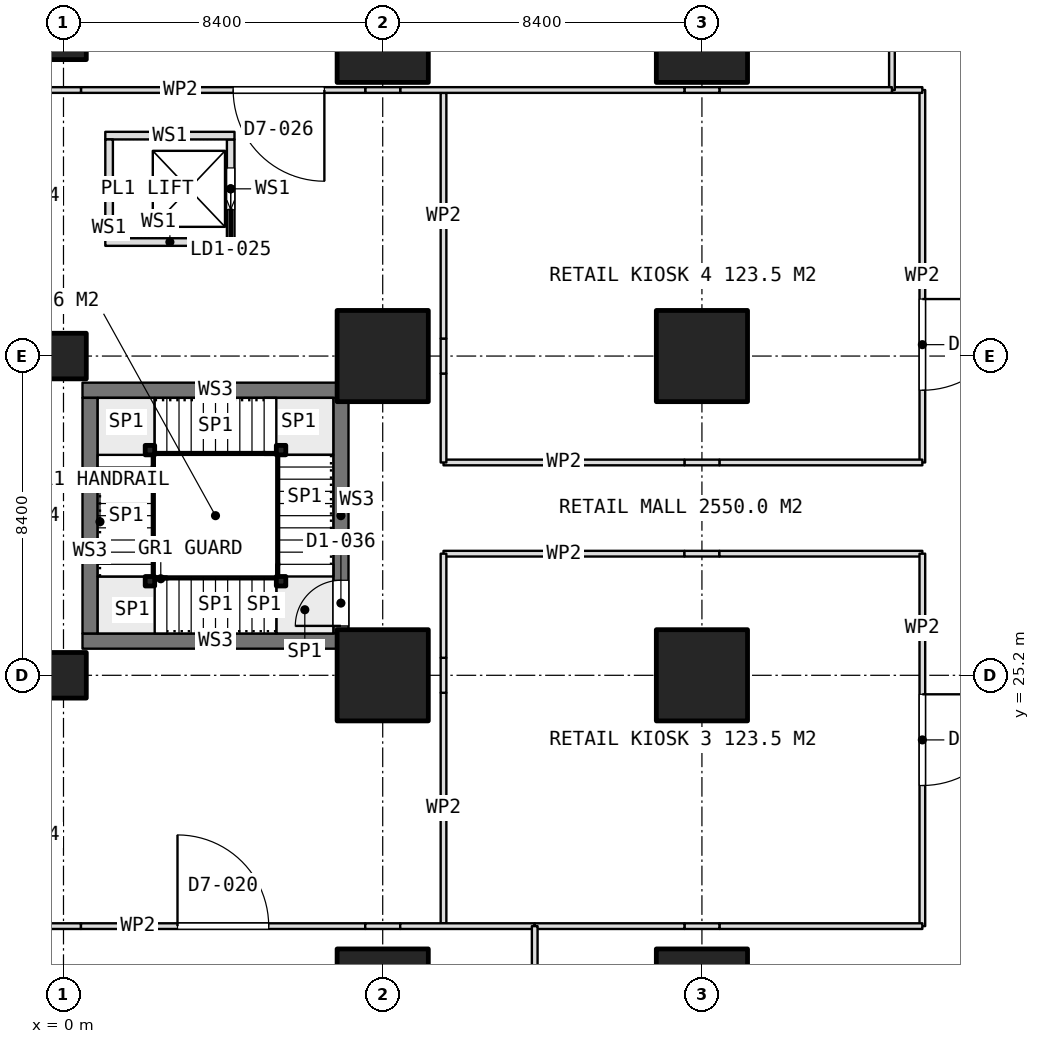
"""IFC4 building model, lengths in metres.
Left out: names, types, materials, properties, quantities, classifications, styles, units other than length and angle.
Written with IfcOpenShell. Run it as: python <this file> out.ifc"""

import sys

from ifc_helpers import new_model, si_unit, direction, frame, frame_2d, origin, origin_2d, place, context, subcontext, project, spatial, rectangle, extrude, element, fill, save


model = new_model("IFC4")
c1 = context("Model", 3, precision=1e-05, world=origin(), true_north=direction((0.0, 1.0)))
c2 = subcontext(c1, "Body", "Model", "MODEL_VIEW")
j1 = project(units=[si_unit("LENGTHUNIT", "METRE"), si_unit("PLANEANGLEUNIT", "RADIAN")], contexts=[c1])
p1 = place(None, origin())
s1 = spatial("IfcSite", under=j1, at=p1, CompositionType="ELEMENT")
p2 = place(p1, origin())
s2 = spatial("IfcBuilding", under=s1, at=p2, CompositionType="ELEMENT")
p3 = place(p2, frame((0.0, 0.0, 10.4)))
s3 = spatial("IfcBuildingStorey", under=s2, at=p3, CompositionType="ELEMENT", Elevation=10.4)
for number, where, z_axis, x_axis in (
    (1, (0.0, 25.2, 0.0), (0.0, 0.0, 1.0), (1.0, 0.0, 0.0)),
    (2, (0.0, 33.6, 0.0), (0.0, 0.0, 1.0), (1.0, 0.0, 0.0)),
    (3, (0.0, 42.0, 0.0), (0.0, 0.0, 1.0), (1.0, 0.0, 0.0)),
):
    element("IfcColumn", number, at=place(p3, frame(where, z_axis=z_axis, x_axis=x_axis)), inside=s3, PredefinedType="COLUMN", context=c2, shape_type="SweptSolid", body=[
        extrude(rectangle(XDim=1.2, YDim=1.2, at=origin_2d()), origin(), (0.0, 0.0, 1.0), 5.0),
    ])
for number, where, z_axis, x_axis in (
    (4, (8.4, 16.8, 0.0), (0.0, 0.0, 1.0), (1.0, 0.0, 0.0)),
    (5, (8.4, 25.2, 0.0), (0.0, 0.0, 1.0), (1.0, 0.0, 0.0)),
    (6, (8.4, 33.6, 0.0), (0.0, 0.0, 1.0), (1.0, 0.0, 0.0)),
    (7, (8.4, 42.0, 0.0), (0.0, 0.0, 1.0), (1.0, 0.0, 0.0)),
    (8, (16.8, 16.8, 0.0), (0.0, 0.0, 1.0), (1.0, 0.0, 0.0)),
    (9, (16.8, 25.2, 0.0), (0.0, 0.0, 1.0), (1.0, 0.0, 0.0)),
    (10, (16.8, 33.6, 0.0), (0.0, 0.0, 1.0), (1.0, 0.0, 0.0)),
    (11, (16.8, 42.0, 0.0), (0.0, 0.0, 1.0), (1.0, 0.0, 0.0)),
):
    element("IfcColumn", number, at=place(p3, frame(where, z_axis=z_axis, x_axis=x_axis)), inside=s3, PredefinedType="COLUMN", context=c2, shape_type="SweptSolid", body=[
        extrude(rectangle(XDim=2.4, YDim=2.4, at=origin_2d()), origin(), (0.0, 0.0, 1.0), 5.0),
    ])
for number, where, z_axis, x_axis in (
    (12, (0.5, 26.1, 0.0), (0.0, 0.0, 1.0), (1.0, 0.0, 0.0)),
    (13, (0.5, 32.7, 0.0), (0.0, 0.0, 1.0), (1.0, 0.0, 0.0)),
):
    element("IfcWall", number, at=place(p3, frame(where, z_axis=z_axis, x_axis=x_axis)), inside=s3, PredefinedType="SOLIDWALL", context=c2, shape_type="SweptSolid", body=[
        extrude(rectangle(XDim=7.0, YDim=0.4, at=frame_2d((3.5, 0.0))), origin(), (0.0, 0.0, 1.0), 4.7),
    ])
p4 = place(p3, frame((0.7, 26.3, 0.0), z_axis=(0.0, 0.0, 1.0), x_axis=(0.0, 1.0, 0.0)))
e14 = element("IfcWall", 14, at=p4, inside=s3, PredefinedType="SOLIDWALL", context=c2, shape_type="SweptSolid", body=[
    extrude(rectangle(XDim=6.2, YDim=0.4, at=frame_2d((3.1, 0.0))), origin(), (0.0, 0.0, 1.0), 4.7),
])
p5 = place(p3, frame((7.3, 26.3, 0.0), z_axis=(0.0, 0.0, 1.0), x_axis=(0.0, 1.0, 0.0)))
e15 = element("IfcWall", 15, at=p5, inside=s3, PredefinedType="SOLIDWALL", context=c2, shape_type="SweptSolid", body=[
    extrude(rectangle(XDim=6.2, YDim=0.4, at=frame_2d((3.1, 0.0))), origin(), (0.0, 0.0, 1.0), 4.7),
])
p6 = place(p5, frame((0.2, 0.0, 0.0)))
e16 = element("IfcOpeningElement", 16, at=p6, cuts=e15, PredefinedType="OPENING", context=c2, shape_type="SweptSolid", body=[
    extrude(rectangle(XDim=1.2, YDim=2.1, at=frame_2d((0.6, 1.05))), frame((0.0, 0.21, 0.0), z_axis=(0.0, -1.0, 0.0), x_axis=(1.0, 0.0, 0.0)), (0.0, 0.0, 1.0), 0.42),
])
for number, where, z_axis, x_axis in (
    (17, (1.1, 36.6, 0.0), (0.0, 0.0, 1.0), (1.0, 0.0, 0.0)),
    (18, (1.1, 39.4, 0.0), (0.0, 0.0, 1.0), (1.0, 0.0, 0.0)),
):
    element("IfcWall", number, at=place(p3, frame(where, z_axis=z_axis, x_axis=x_axis)), inside=s3, PredefinedType="PARTITIONING", context=c2, shape_type="SweptSolid", body=[
        extrude(rectangle(XDim=3.4, YDim=0.2, at=frame_2d((1.7, 0.0))), origin(), (0.0, 0.0, 1.0), 2.9),
    ])
p7 = place(p3, frame((1.2, 36.7, 0.0), z_axis=(0.0, 0.0, 1.0), x_axis=(0.0, 1.0, 0.0)))
e19 = element("IfcWall", 19, at=p7, inside=s3, PredefinedType="PARTITIONING", context=c2, shape_type="SweptSolid", body=[
    extrude(rectangle(XDim=2.6, YDim=0.2, at=frame_2d((1.3, 0.0))), origin(), (0.0, 0.0, 1.0), 2.9),
])
p8 = place(p3, frame((4.4, 36.7, 0.0), z_axis=(0.0, 0.0, 1.0), x_axis=(0.0, 1.0, 0.0)))
e20 = element("IfcWall", 20, at=p8, inside=s3, PredefinedType="PARTITIONING", context=c2, shape_type="SweptSolid", body=[
    extrude(rectangle(XDim=2.6, YDim=0.2, at=frame_2d((1.3, 0.0))), origin(), (0.0, 0.0, 1.0), 2.9),
])
p9 = place(p8, frame((0.75, 0.0, 0.0)))
e21 = element("IfcOpeningElement", 21, at=p9, cuts=e20, PredefinedType="OPENING", context=c2, shape_type="SweptSolid", body=[
    extrude(rectangle(XDim=1.1, YDim=2.1, at=frame_2d((0.55, 1.05))), frame((0.0, 0.11, 0.0), z_axis=(0.0, -1.0, 0.0), x_axis=(1.0, 0.0, 0.0)), (0.0, 0.0, 1.0), 0.22),
])
p10 = place(p3, frame((21.8, 49.94, 0.0), z_axis=(0.0, 0.0, 1.0), x_axis=(0.0, -1.0, 0.0)))
e22 = element("IfcWall", 22, at=p10, inside=s3, PredefinedType="PARTITIONING", context=c2, shape_type="SweptSolid", body=[
    extrude(rectangle(XDim=9.34, YDim=0.15, at=frame_2d((4.67, 0.0))), origin(), (0.0, 0.0, 1.0), 4.7),
])
p11 = place(p10, frame((3.005, 0.0, 0.0)))
e23 = element("IfcOpeningElement", 23, at=p11, cuts=e22, PredefinedType="OPENING", context=c2, shape_type="SweptSolid", body=[
    extrude(rectangle(XDim=2.4, YDim=2.4, at=frame_2d((1.2, 1.2))), frame((0.0, 0.085, 0.0), z_axis=(0.0, -1.0, 0.0), x_axis=(1.0, 0.0, 0.0)), (0.0, 0.0, 1.0), 0.17),
])
p12 = place(p3, frame((21.8, 40.6, 0.0), z_axis=(0.0, 0.0, 1.0), x_axis=(-1.0, 0.0, 0.0)))
e24 = element("IfcWall", 24, at=p12, inside=s3, PredefinedType="PARTITIONING", context=c2, shape_type="SweptSolid", body=[
    extrude(rectangle(XDim=4.54, YDim=0.15, at=frame_2d((2.27, 0.0))), origin(), (0.0, 0.0, 1.0), 4.7),
])
p13 = place(p3, frame((17.26, 40.6, 0.0), z_axis=(0.0, 0.0, 1.0), x_axis=(-1.0, 0.0, 0.0)))
e25 = element("IfcWall", 25, at=p13, inside=s3, PredefinedType="PARTITIONING", context=c2, shape_type="SweptSolid", body=[
    extrude(rectangle(XDim=0.92, YDim=0.15, at=frame_2d((0.46, 0.0))), origin(), (0.0, 0.0, 1.0), 2.9),
])
p14 = place(p3, frame((16.34, 40.6, 0.0), z_axis=(0.0, 0.0, 1.0), x_axis=(-1.0, 0.0, 0.0)))
e26 = element("IfcWall", 26, at=p14, inside=s3, PredefinedType="PARTITIONING", context=c2, shape_type="SweptSolid", body=[
    extrude(rectangle(XDim=7.48, YDim=0.15, at=frame_2d((3.74, 0.0))), origin(), (0.0, 0.0, 1.0), 4.7),
])
p15 = place(p3, frame((8.86, 40.6, 0.0), z_axis=(0.0, 0.0, 1.0), x_axis=(-1.0, 0.0, 0.0)))
e27 = element("IfcWall", 27, at=p15, inside=s3, PredefinedType="PARTITIONING", context=c2, shape_type="SweptSolid", body=[
    extrude(rectangle(XDim=0.92, YDim=0.15, at=frame_2d((0.46, 0.0))), origin(), (0.0, 0.0, 1.0), 2.9),
])
p16 = place(p3, frame((7.94, 40.6, 0.0), z_axis=(0.0, 0.0, 1.0), x_axis=(-1.0, 0.0, 0.0)))
e28 = element("IfcWall", 28, at=p16, inside=s3, PredefinedType="PARTITIONING", context=c2, shape_type="SweptSolid", body=[
    extrude(rectangle(XDim=7.48, YDim=0.15, at=frame_2d((3.74, 0.0))), origin(), (0.0, 0.0, 1.0), 4.7),
])
p17 = place(p16, frame((1.075, 0.0, 0.0)))
e29 = element("IfcOpeningElement", 29, at=p17, cuts=e28, PredefinedType="OPENING", context=c2, shape_type="SweptSolid", body=[
    extrude(rectangle(XDim=2.4, YDim=2.4, at=frame_2d((1.2, 1.2))), frame((0.0, 0.085, 0.0), z_axis=(0.0, -1.0, 0.0), x_axis=(1.0, 0.0, 0.0)), (0.0, 0.0, 1.0), 0.17),
])
for number, where, z_axis, x_axis in (
    (30, (0.46, 40.6, 0.0), (0.0, 0.0, 1.0), (-1.0, 0.0, 0.0)),
    (31, (-0.49, 18.6, 0.0), (0.0, 0.0, 1.0), (1.0, 0.0, 0.0)),
):
    element("IfcWall", number, at=place(p3, frame(where, z_axis=z_axis, x_axis=x_axis)), inside=s3, PredefinedType="PARTITIONING", context=c2, shape_type="SweptSolid", body=[
        extrude(rectangle(XDim=0.95, YDim=0.15, at=frame_2d((0.475, 0.0))), origin(), (0.0, 0.0, 1.0), 2.9),
    ])
p18 = place(p3, frame((0.46, 18.6, 0.0), z_axis=(0.0, 0.0, 1.0), x_axis=(1.0, 0.0, 0.0)))
e32 = element("IfcWall", 32, at=p18, inside=s3, PredefinedType="PARTITIONING", context=c2, shape_type="SweptSolid", body=[
    extrude(rectangle(XDim=7.48, YDim=0.15, at=frame_2d((3.74, 0.0))), origin(), (0.0, 0.0, 1.0), 4.7),
])
p19 = place(p18, frame((2.54, 0.0, 0.0)))
e33 = element("IfcOpeningElement", 33, at=p19, cuts=e32, PredefinedType="OPENING", context=c2, shape_type="SweptSolid", body=[
    extrude(rectangle(XDim=2.4, YDim=2.4, at=frame_2d((1.2, 1.2))), frame((0.0, 0.085, 0.0), z_axis=(0.0, -1.0, 0.0), x_axis=(1.0, 0.0, 0.0)), (0.0, 0.0, 1.0), 0.17),
])
p20 = place(p3, frame((7.94, 18.6, 0.0), z_axis=(0.0, 0.0, 1.0), x_axis=(1.0, 0.0, 0.0)))
e34 = element("IfcWall", 34, at=p20, inside=s3, PredefinedType="PARTITIONING", context=c2, shape_type="SweptSolid", body=[
    extrude(rectangle(XDim=0.92, YDim=0.15, at=frame_2d((0.46, 0.0))), origin(), (0.0, 0.0, 1.0), 2.9),
])
p21 = place(p3, frame((8.86, 18.6, 0.0), z_axis=(0.0, 0.0, 1.0), x_axis=(1.0, 0.0, 0.0)))
e35 = element("IfcWall", 35, at=p21, inside=s3, PredefinedType="PARTITIONING", context=c2, shape_type="SweptSolid", body=[
    extrude(rectangle(XDim=3.54, YDim=0.15, at=frame_2d((1.77, 0.0))), origin(), (0.0, 0.0, 1.0), 4.7),
])
p22 = place(p3, frame((12.4, 18.6, 0.0), z_axis=(0.0, 0.0, 1.0), x_axis=(0.0, -1.0, 0.0)))
e36 = element("IfcWall", 36, at=p22, inside=s3, PredefinedType="PARTITIONING", context=c2, shape_type="SweptSolid", body=[
    extrude(rectangle(XDim=1.34, YDim=0.15, at=frame_2d((0.67, 0.0))), origin(), (0.0, 0.0, 1.0), 4.7),
])
p23 = place(p3, frame((10.0, 28.4, 0.0), z_axis=(0.0, 0.0, 1.0), x_axis=(1.0, 0.0, 0.0)))
e37 = element("IfcWall", 37, at=p23, inside=s3, PredefinedType="PARTITIONING", context=c2, shape_type="SweptSolid", body=[
    extrude(rectangle(XDim=6.34, YDim=0.15, at=frame_2d((3.17, 0.0))), origin(), (0.0, 0.0, 1.0), 4.7),
])
p24 = place(p3, frame((16.34, 28.4, 0.0), z_axis=(0.0, 0.0, 1.0), x_axis=(1.0, 0.0, 0.0)))
e38 = element("IfcWall", 38, at=p24, inside=s3, PredefinedType="PARTITIONING", context=c2, shape_type="SweptSolid", body=[
    extrude(rectangle(XDim=0.92, YDim=0.15, at=frame_2d((0.46, 0.0))), origin(), (0.0, 0.0, 1.0), 2.9),
])
p25 = place(p3, frame((17.26, 28.4, 0.0), z_axis=(0.0, 0.0, 1.0), x_axis=(1.0, 0.0, 0.0)))
e39 = element("IfcWall", 39, at=p25, inside=s3, PredefinedType="PARTITIONING", context=c2, shape_type="SweptSolid", body=[
    extrude(rectangle(XDim=5.34, YDim=0.15, at=frame_2d((2.67, 0.0))), origin(), (0.0, 0.0, 1.0), 4.7),
])
p26 = place(p3, frame((22.6, 28.4, 0.0), z_axis=(0.0, 0.0, 1.0), x_axis=(0.0, -1.0, 0.0)))
e40 = element("IfcWall", 40, at=p26, inside=s3, PredefinedType="PARTITIONING", context=c2, shape_type="SweptSolid", body=[
    extrude(rectangle(XDim=9.8, YDim=0.15, at=frame_2d((4.9, 0.0))), origin(), (0.0, 0.0, 1.0), 4.7),
])
p27 = place(p26, frame((3.7, 0.0, 0.0)))
e41 = element("IfcOpeningElement", 41, at=p27, cuts=e40, PredefinedType="OPENING", context=c2, shape_type="SweptSolid", body=[
    extrude(rectangle(XDim=2.4, YDim=2.4, at=frame_2d((1.2, 1.2))), frame((0.0, 0.085, 0.0), z_axis=(0.0, -1.0, 0.0), x_axis=(1.0, 0.0, 0.0)), (0.0, 0.0, 1.0), 0.17),
])
p28 = place(p3, frame((22.6, 18.6, 0.0), z_axis=(0.0, 0.0, 1.0), x_axis=(-1.0, 0.0, 0.0)))
e42 = element("IfcWall", 42, at=p28, inside=s3, PredefinedType="PARTITIONING", context=c2, shape_type="SweptSolid", body=[
    extrude(rectangle(XDim=5.34, YDim=0.15, at=frame_2d((2.67, 0.0))), origin(), (0.0, 0.0, 1.0), 4.7),
])
p29 = place(p3, frame((17.26, 18.6, 0.0), z_axis=(0.0, 0.0, 1.0), x_axis=(-1.0, 0.0, 0.0)))
e43 = element("IfcWall", 43, at=p29, inside=s3, PredefinedType="PARTITIONING", context=c2, shape_type="SweptSolid", body=[
    extrude(rectangle(XDim=0.92, YDim=0.15, at=frame_2d((0.46, 0.0))), origin(), (0.0, 0.0, 1.0), 2.9),
])
p30 = place(p3, frame((16.34, 18.6, 0.0), z_axis=(0.0, 0.0, 1.0), x_axis=(-1.0, 0.0, 0.0)))
e44 = element("IfcWall", 44, at=p30, inside=s3, PredefinedType="PARTITIONING", context=c2, shape_type="SweptSolid", body=[
    extrude(rectangle(XDim=3.94, YDim=0.15, at=frame_2d((1.97, 0.0))), origin(), (0.0, 0.0, 1.0), 4.7),
])
p31 = place(p3, frame((10.0, 18.675, 0.0), z_axis=(0.0, 0.0, 1.0), x_axis=(0.0, 1.0, 0.0)))
e45 = element("IfcWall", 45, at=p31, inside=s3, PredefinedType="PARTITIONING", context=c2, shape_type="SweptSolid", body=[
    extrude(rectangle(XDim=6.065, YDim=0.15, at=frame_2d((3.032, 0.0))), origin(), (0.0, 0.0, 1.0), 4.7),
])
p32 = place(p3, frame((10.0, 24.74, 0.0), z_axis=(0.0, 0.0, 1.0), x_axis=(0.0, 1.0, 0.0)))
e46 = element("IfcWall", 46, at=p32, inside=s3, PredefinedType="PARTITIONING", context=c2, shape_type="SweptSolid", body=[
    extrude(rectangle(XDim=0.92, YDim=0.15, at=frame_2d((0.46, 0.0))), origin(), (0.0, 0.0, 1.0), 2.9),
])
p33 = place(p3, frame((10.0, 25.66, 0.0), z_axis=(0.0, 0.0, 1.0), x_axis=(0.0, 1.0, 0.0)))
e47 = element("IfcWall", 47, at=p33, inside=s3, PredefinedType="PARTITIONING", context=c2, shape_type="SweptSolid", body=[
    extrude(rectangle(XDim=2.74, YDim=0.15, at=frame_2d((1.37, 0.0))), origin(), (0.0, 0.0, 1.0), 4.7),
])
p34 = place(p3, frame((22.6, 40.6, 0.0), z_axis=(0.0, 0.0, 1.0), x_axis=(0.0, -1.0, 0.0)))
e48 = element("IfcWall", 48, at=p34, inside=s3, PredefinedType="PARTITIONING", context=c2, shape_type="SweptSolid", body=[
    extrude(rectangle(XDim=9.8, YDim=0.15, at=frame_2d((4.9, 0.0))), origin(), (0.0, 0.0, 1.0), 4.7),
])
p35 = place(p34, frame((5.5, 0.0, 0.0)))
e49 = element("IfcOpeningElement", 49, at=p35, cuts=e48, PredefinedType="OPENING", context=c2, shape_type="SweptSolid", body=[
    extrude(rectangle(XDim=2.4, YDim=2.4, at=frame_2d((1.2, 1.2))), frame((0.0, 0.085, 0.0), z_axis=(0.0, -1.0, 0.0), x_axis=(1.0, 0.0, 0.0)), (0.0, 0.0, 1.0), 0.17),
])
p36 = place(p3, frame((22.6, 30.8, 0.0), z_axis=(0.0, 0.0, 1.0), x_axis=(-1.0, 0.0, 0.0)))
e50 = element("IfcWall", 50, at=p36, inside=s3, PredefinedType="PARTITIONING", context=c2, shape_type="SweptSolid", body=[
    extrude(rectangle(XDim=5.34, YDim=0.15, at=frame_2d((2.67, 0.0))), origin(), (0.0, 0.0, 1.0), 4.7),
])
p37 = place(p3, frame((17.26, 30.8, 0.0), z_axis=(0.0, 0.0, 1.0), x_axis=(-1.0, 0.0, 0.0)))
e51 = element("IfcWall", 51, at=p37, inside=s3, PredefinedType="PARTITIONING", context=c2, shape_type="SweptSolid", body=[
    extrude(rectangle(XDim=0.92, YDim=0.15, at=frame_2d((0.46, 0.0))), origin(), (0.0, 0.0, 1.0), 2.9),
])
p38 = place(p3, frame((16.34, 30.8, 0.0), z_axis=(0.0, 0.0, 1.0), x_axis=(-1.0, 0.0, 0.0)))
e52 = element("IfcWall", 52, at=p38, inside=s3, PredefinedType="PARTITIONING", context=c2, shape_type="SweptSolid", body=[
    extrude(rectangle(XDim=6.34, YDim=0.15, at=frame_2d((3.17, 0.0))), origin(), (0.0, 0.0, 1.0), 4.7),
])
p39 = place(p3, frame((10.0, 30.8, 0.0), z_axis=(0.0, 0.0, 1.0), x_axis=(0.0, 1.0, 0.0)))
e53 = element("IfcWall", 53, at=p39, inside=s3, PredefinedType="PARTITIONING", context=c2, shape_type="SweptSolid", body=[
    extrude(rectangle(XDim=2.34, YDim=0.15, at=frame_2d((1.17, 0.0))), origin(), (0.0, 0.0, 1.0), 4.7),
])
p40 = place(p3, frame((10.0, 33.14, 0.0), z_axis=(0.0, 0.0, 1.0), x_axis=(0.0, 1.0, 0.0)))
e54 = element("IfcWall", 54, at=p40, inside=s3, PredefinedType="PARTITIONING", context=c2, shape_type="SweptSolid", body=[
    extrude(rectangle(XDim=0.92, YDim=0.15, at=frame_2d((0.46, 0.0))), origin(), (0.0, 0.0, 1.0), 2.9),
])
p41 = place(p3, frame((10.0, 34.06, 0.0), z_axis=(0.0, 0.0, 1.0), x_axis=(0.0, 1.0, 0.0)))
e55 = element("IfcWall", 55, at=p41, inside=s3, PredefinedType="PARTITIONING", context=c2, shape_type="SweptSolid", body=[
    extrude(rectangle(XDim=6.465, YDim=0.15, at=frame_2d((3.232, 0.0))), origin(), (0.0, 0.0, 1.0), 4.7),
])
p42 = place(p3, frame((21.8, 40.6, 0.0), z_axis=(0.0, 0.0, 1.0), x_axis=(1.0, 0.0, 0.0)))
e56 = element("IfcWall", 56, at=p42, inside=s3, PredefinedType="PARTITIONING", context=c2, shape_type="SweptSolid", body=[
    extrude(rectangle(XDim=0.8, YDim=0.15, at=frame_2d((0.4, 0.0))), origin(), (0.0, 0.0, 1.0), 4.7),
])
for number, where, z_axis, x_axis in (
    (57, (5.725, 27.675, 0.0), (0.0, 0.0, 1.0), (1.0, 0.0, 0.0)),
    (58, (2.275, 27.675, 0.0), (0.0, 0.0, 1.0), (1.0, 0.0, 0.0)),
    (59, (2.275, 31.125, 0.0), (0.0, 0.0, 1.0), (1.0, 0.0, 0.0)),
    (60, (5.725, 31.125, 0.0), (0.0, 0.0, 1.0), (1.0, 0.0, 0.0)),
):
    element("IfcColumn", number, at=place(p3, frame(where, z_axis=z_axis, x_axis=x_axis)), inside=s3, PredefinedType="COLUMN", context=c2, shape_type="SweptSolid", body=[
        extrude(rectangle(XDim=0.25, YDim=0.25, at=origin_2d()), origin(), (0.0, 0.0, 1.0), 5.0),
    ])
p43 = place(p9, origin())
e61 = element("IfcDoor", 61, at=p43, inside=s3, OperationType="SLIDING_TO_LEFT", PredefinedType="USERDEFINED", context=c2, shape_type="SweptSolid", body=[
    extrude(rectangle(XDim=1.1, YDim=2.1, at=frame_2d((0.55, 1.05))), frame((0.0, 0.025, 0.0), z_axis=(0.0, -1.0, 0.0), x_axis=(1.0, 0.0, 0.0)), (0.0, 0.0, 1.0), 0.05),
])
fill(e21, e61)
p44 = place(p17, origin())
e62 = element("IfcDoor", 62, at=p44, inside=s3, OperationType="DOUBLE_DOOR_SINGLE_SWING", PredefinedType="DOOR", context=c2, shape_type="SweptSolid", body=[
    extrude(rectangle(XDim=2.4, YDim=2.4, at=frame_2d((1.2, 1.2))), frame((0.0, 0.025, 0.0), z_axis=(0.0, -1.0, 0.0), x_axis=(1.0, 0.0, 0.0)), (0.0, 0.0, 1.0), 0.05),
])
fill(e29, e62)
p45 = place(p19, origin())
e63 = element("IfcDoor", 63, at=p45, inside=s3, OperationType="DOUBLE_DOOR_SINGLE_SWING", PredefinedType="DOOR", context=c2, shape_type="SweptSolid", body=[
    extrude(rectangle(XDim=2.4, YDim=2.4, at=frame_2d((1.2, 1.2))), frame((0.0, 0.025, 0.0), z_axis=(0.0, -1.0, 0.0), x_axis=(1.0, 0.0, 0.0)), (0.0, 0.0, 1.0), 0.05),
])
fill(e33, e63)
p46 = place(p27, origin())
e64 = element("IfcDoor", 64, at=p46, inside=s3, OperationType="DOUBLE_DOOR_SINGLE_SWING", PredefinedType="DOOR", context=c2, shape_type="SweptSolid", body=[
    extrude(rectangle(XDim=2.4, YDim=2.4, at=frame_2d((1.2, 1.2))), frame((0.0, 0.025, 0.0), z_axis=(0.0, -1.0, 0.0), x_axis=(1.0, 0.0, 0.0)), (0.0, 0.0, 1.0), 0.05),
])
fill(e41, e64)
p47 = place(p35, origin())
e65 = element("IfcDoor", 65, at=p47, inside=s3, OperationType="DOUBLE_DOOR_SINGLE_SWING", PredefinedType="DOOR", context=c2, shape_type="SweptSolid", body=[
    extrude(rectangle(XDim=2.4, YDim=2.4, at=frame_2d((1.2, 1.2))), frame((0.0, 0.025, 0.0), z_axis=(0.0, -1.0, 0.0), x_axis=(1.0, 0.0, 0.0)), (0.0, 0.0, 1.0), 0.05),
])
fill(e49, e65)
p48 = place(p6, origin())
e66 = element("IfcDoor", 66, at=p48, inside=s3, OperationType="SINGLE_SWING_RIGHT", PredefinedType="DOOR", context=c2, shape_type="SweptSolid", body=[
    extrude(rectangle(XDim=1.2, YDim=2.1, at=frame_2d((0.6, 1.05))), frame((0.0, 0.025, 0.0), z_axis=(0.0, -1.0, 0.0), x_axis=(1.0, 0.0, 0.0)), (0.0, 0.0, 1.0), 0.05),
])
fill(e16, e66)
save(model, sys.argv[1])
